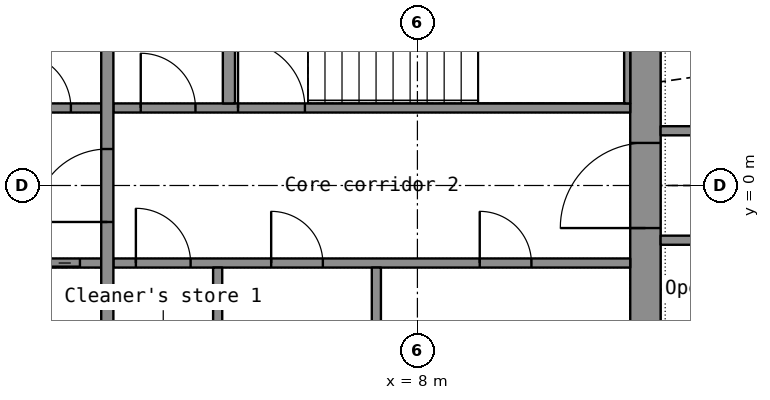
"""IFC4 building model, lengths in metres.
Left out: names, types, materials, properties, quantities, classifications, styles, units other than length and angle.
Written with IfcOpenShell. Run it as: python <this file> out.ifc"""

import sys

from ifc_helpers import new_model, si_unit, direction, frame, frame_2d, origin, place, context, subcontext, project, spatial, rectangle, extrude, element, fill, save


model = new_model("IFC4")
c1 = context("Model", 3, precision=1e-05, world=origin(), true_north=direction((0.0, 1.0)))
c2 = subcontext(c1, "Body", "Model", "MODEL_VIEW")
j1 = project(units=[si_unit("LENGTHUNIT", "METRE"), si_unit("PLANEANGLEUNIT", "RADIAN")], contexts=[c1])
p1 = place(None, origin())
s1 = spatial("IfcSite", under=j1, at=p1, CompositionType="ELEMENT")
p2 = place(p1, origin())
s2 = spatial("IfcBuilding", under=s1, at=p2, CompositionType="ELEMENT")
p3 = place(p2, frame((0.0, 0.0, 130.4)))
s3 = spatial("IfcBuildingStorey", under=s2, at=p3, CompositionType="ELEMENT", Elevation=130.4)
p4 = place(p3, frame((11.75, -7.2, 0.0), z_axis=(0.0, 0.0, 1.0), x_axis=(0.0, 1.0, 0.0)))
e1 = element("IfcWall", 1, at=p4, inside=s3, PredefinedType="SHEAR", context=c2, shape_type="SweptSolid", body=[
    extrude(rectangle(XDim=14.4, YDim=0.5, at=frame_2d((7.2, 0.0))), origin(), (0.0, 0.0, 1.0), 3.3),
])
p5 = place(p4, frame((6.5, 0.0, 0.0)))
e2 = element("IfcOpeningElement", 2, at=p5, cuts=e1, PredefinedType="OPENING", context=c2, shape_type="SweptSolid", body=[
    extrude(rectangle(XDim=1.4, YDim=2.2, at=frame_2d((0.7, 1.1))), frame((0.0, 0.26, 0.0), z_axis=(0.0, -1.0, 0.0), x_axis=(1.0, 0.0, 0.0)), (0.0, 0.0, 1.0), 0.52),
])
p6 = place(p3, frame((-2.8, -1.275, 0.0), z_axis=(0.0, 0.0, 1.0), x_axis=(1.0, 0.0, 0.0)))
e3 = element("IfcWall", 3, at=p6, inside=s3, PredefinedType="SHEAR", context=c2, shape_type="SweptSolid", body=[
    extrude(rectangle(XDim=5.6, YDim=0.15, at=frame_2d((2.8, 0.0))), origin(), (0.0, 0.0, 1.0), 3.3),
])
p7 = place(p6, frame((4.15, 0.0, 0.0)))
e4 = element("IfcOpeningElement", 4, at=p7, cuts=e3, PredefinedType="OPENING", context=c2, shape_type="SweptSolid", body=[
    extrude(rectangle(XDim=1.1, YDim=2.2, at=frame_2d((0.55, 1.1))), frame((0.0, 0.085, 0.0), z_axis=(0.0, -1.0, 0.0), x_axis=(1.0, 0.0, 0.0)), (0.0, 0.0, 1.0), 0.17),
])
p8 = place(p6, frame((1.35, 0.0, 0.0)))
e5 = element("IfcOpeningElement", 5, at=p8, cuts=e3, PredefinedType="OPENING", context=c2, shape_type="SweptSolid", body=[
    extrude(rectangle(XDim=0.9, YDim=2.1, at=frame_2d((0.45, 1.05))), frame((0.0, 0.085, 0.0), z_axis=(0.0, -1.0, 0.0), x_axis=(1.0, 0.0, 0.0)), (0.0, 0.0, 1.0), 0.17),
])
p9 = place(p3, frame((3.0, -1.275, 0.0), z_axis=(0.0, 0.0, 1.0), x_axis=(1.0, 0.0, 0.0)))
e6 = element("IfcWall", 6, at=p9, inside=s3, PredefinedType="PARTITIONING", context=c2, shape_type="SweptSolid", body=[
    extrude(rectangle(XDim=8.5, YDim=0.15, at=frame_2d((4.25, 0.0))), origin(), (0.0, 0.0, 1.0), 3.3),
])
p10 = place(p9, frame((0.37, 0.0, 0.0)))
e7 = element("IfcOpeningElement", 7, at=p10, cuts=e6, PredefinedType="OPENING", context=c2, shape_type="SweptSolid", body=[
    extrude(rectangle(XDim=0.9, YDim=2.1, at=frame_2d((0.45, 1.05))), frame((0.0, 0.085, 0.0), z_axis=(0.0, -1.0, 0.0), x_axis=(1.0, 0.0, 0.0)), (0.0, 0.0, 1.0), 0.17),
])
p11 = place(p9, frame((2.595, 0.0, 0.0)))
e8 = element("IfcOpeningElement", 8, at=p11, cuts=e6, PredefinedType="OPENING", context=c2, shape_type="SweptSolid", body=[
    extrude(rectangle(XDim=0.85, YDim=2.1, at=frame_2d((0.425, 1.05))), frame((0.0, 0.085, 0.0), z_axis=(0.0, -1.0, 0.0), x_axis=(1.0, 0.0, 0.0)), (0.0, 0.0, 1.0), 0.17),
])
p12 = place(p9, frame((6.025, 0.0, 0.0)))
e9 = element("IfcOpeningElement", 9, at=p12, cuts=e6, PredefinedType="OPENING", context=c2, shape_type="SweptSolid", body=[
    extrude(rectangle(XDim=0.85, YDim=2.1, at=frame_2d((0.425, 1.05))), frame((0.0, 0.085, 0.0), z_axis=(0.0, -1.0, 0.0), x_axis=(1.0, 0.0, 0.0)), (0.0, 0.0, 1.0), 0.17),
])
p13 = place(p3, frame((-2.8, 1.275, 0.0), z_axis=(0.0, 0.0, 1.0), x_axis=(1.0, 0.0, 0.0)))
e10 = element("IfcWall", 10, at=p13, inside=s3, PredefinedType="SHEAR", context=c2, shape_type="SweptSolid", body=[
    extrude(rectangle(XDim=5.6, YDim=0.15, at=frame_2d((2.8, 0.0))), origin(), (0.0, 0.0, 1.0), 3.3),
])
p14 = place(p13, frame((0.35, 0.0, 0.0)))
e11 = element("IfcOpeningElement", 11, at=p14, cuts=e10, PredefinedType="OPENING", context=c2, shape_type="SweptSolid", body=[
    extrude(rectangle(XDim=1.1, YDim=2.2, at=frame_2d((0.55, 1.1))), frame((0.0, 0.085, 0.0), z_axis=(0.0, -1.0, 0.0), x_axis=(1.0, 0.0, 0.0)), (0.0, 0.0, 1.0), 0.17),
])
p15 = place(p13, frame((2.326, 0.0, 0.0)))
e12 = element("IfcOpeningElement", 12, at=p15, cuts=e10, PredefinedType="OPENING", context=c2, shape_type="SweptSolid", body=[
    extrude(rectangle(XDim=0.9, YDim=2.1, at=frame_2d((0.45, 1.05))), frame((0.0, 0.085, 0.0), z_axis=(0.0, -1.0, 0.0), x_axis=(1.0, 0.0, 0.0)), (0.0, 0.0, 1.0), 0.17),
])
p16 = place(p13, frame((4.201, 0.0, 0.0)))
e13 = element("IfcOpeningElement", 13, at=p16, cuts=e10, PredefinedType="OPENING", context=c2, shape_type="SweptSolid", body=[
    extrude(rectangle(XDim=0.9, YDim=2.1, at=frame_2d((0.45, 1.05))), frame((0.0, 0.085, 0.0), z_axis=(0.0, -1.0, 0.0), x_axis=(1.0, 0.0, 0.0)), (0.0, 0.0, 1.0), 0.17),
])
p17 = place(p3, frame((3.0, 1.275, 0.0), z_axis=(0.0, 0.0, 1.0), x_axis=(1.0, 0.0, 0.0)))
e14 = element("IfcWall", 14, at=p17, inside=s3, PredefinedType="SHEAR", context=c2, shape_type="SweptSolid", body=[
    extrude(rectangle(XDim=8.5, YDim=0.15, at=frame_2d((4.25, 0.0))), origin(), (0.0, 0.0, 1.0), 3.3),
])
p18 = place(p17, frame((2.05, 0.0, 0.0)))
e15 = element("IfcOpeningElement", 15, at=p18, cuts=e14, PredefinedType="OPENING", context=c2, shape_type="SweptSolid", body=[
    extrude(rectangle(XDim=1.1, YDim=2.15, at=frame_2d((0.55, 1.075))), frame((0.0, 0.085, 0.0), z_axis=(0.0, -1.0, 0.0), x_axis=(1.0, 0.0, 0.0)), (0.0, 0.0, 1.0), 0.17),
])
p19 = place(p17, frame((0.45, 0.0, 0.0)))
e16 = element("IfcOpeningElement", 16, at=p19, cuts=e14, PredefinedType="OPENING", context=c2, shape_type="SweptSolid", body=[
    extrude(rectangle(XDim=0.9, YDim=2.1, at=frame_2d((0.45, 1.05))), frame((0.0, 0.085, 0.0), z_axis=(0.0, -1.0, 0.0), x_axis=(1.0, 0.0, 0.0)), (0.0, 0.0, 1.0), 0.17),
])
p20 = place(p3, frame((2.9, -3.7, 0.0), z_axis=(0.0, 0.0, 1.0), x_axis=(0.0, 1.0, 0.0)))
e17 = element("IfcWall", 17, at=p20, inside=s3, PredefinedType="SHEAR", context=c2, shape_type="SweptSolid", body=[
    extrude(rectangle(XDim=7.4, YDim=0.2, at=frame_2d((3.7, 0.0))), origin(), (0.0, 0.0, 1.0), 3.3),
])
p21 = place(p20, frame((3.1, 0.0, 0.0)))
e18 = element("IfcOpeningElement", 18, at=p21, cuts=e17, PredefinedType="OPENING", context=c2, shape_type="SweptSolid", body=[
    extrude(rectangle(XDim=1.2, YDim=2.2, at=frame_2d((0.6, 1.1))), frame((0.0, 0.11, 0.0), z_axis=(0.0, -1.0, 0.0), x_axis=(1.0, 0.0, 0.0)), (0.0, 0.0, 1.0), 0.22),
])
p22 = place(p3, frame((11.45, 1.35, 0.0), z_axis=(0.0, 0.0, 1.0), x_axis=(0.0, 1.0, 0.0)))
e19 = element("IfcWall", 19, at=p22, inside=s3, PredefinedType="SHEAR", context=c2, shape_type="SweptSolid", body=[
    extrude(rectangle(XDim=2.35, YDim=0.1, at=frame_2d((1.175, 0.0))), origin(), (0.0, 0.0, 1.0), 3.3),
])
p23 = place(p3, frame((4.9, 1.35, 0.0), z_axis=(0.0, 0.0, 1.0), x_axis=(0.0, 1.0, 0.0)))
e20 = element("IfcWall", 20, at=p23, inside=s3, PredefinedType="SHEAR", context=c2, shape_type="SweptSolid", body=[
    extrude(rectangle(XDim=2.35, YDim=0.2, at=frame_2d((1.175, 0.0))), origin(), (0.0, 0.0, 1.0), 3.3),
])
for number, where, z_axis, x_axis in (
    (21, (4.715, -3.7, 0.0), (0.0, 0.0, 1.0), (0.0, 1.0, 0.0)),
    (22, (7.325, -3.7, 0.0), (0.0, 0.0, 1.0), (0.0, 1.0, 0.0)),
):
    element("IfcWall", number, at=place(p3, frame(where, z_axis=z_axis, x_axis=x_axis)), inside=s3, PredefinedType="PARTITIONING", context=c2, shape_type="SweptSolid", body=[
        extrude(rectangle(XDim=2.35, YDim=0.15, at=frame_2d((1.175, 0.0))), origin(), (0.0, 0.0, 1.0), 3.3),
    ])
p24 = place(p3, frame((12.0, -0.9, 0.0), z_axis=(0.0, 0.0, 1.0), x_axis=(1.0, 0.0, 0.0)))
e23 = element("IfcWall", 23, at=p24, inside=s3, PredefinedType="PARTITIONING", context=c2, shape_type="SweptSolid", body=[
    extrude(rectangle(XDim=4.0, YDim=0.15, at=frame_2d((2.0, 0.0))), origin(), (0.0, 0.0, 1.0), 2.4),
])
p25 = place(p24, frame((1.4, 0.0, 0.0)))
e24 = element("IfcOpeningElement", 24, at=p25, cuts=e23, PredefinedType="OPENING", context=c2, shape_type="SweptSolid", body=[
    extrude(rectangle(XDim=1.2, YDim=2.2, at=frame_2d((0.6, 1.1))), frame((0.0, 0.085, 0.0), z_axis=(0.0, -1.0, 0.0), x_axis=(1.0, 0.0, 0.0)), (0.0, 0.0, 1.0), 0.17),
])
p26 = place(p3, frame((15.923, 0.9, 0.0), z_axis=(0.0, 0.0, 1.0), x_axis=(-1.0, 0.0, 0.0)))
e25 = element("IfcWall", 25, at=p26, inside=s3, PredefinedType="PARTITIONING", context=c2, shape_type="SweptSolid", body=[
    extrude(rectangle(XDim=3.923, YDim=0.15, at=frame_2d((1.961, 0.0))), origin(), (0.0, 0.0, 1.0), 2.4),
])
p27 = place(p5, origin())
e26 = element("IfcDoor", 26, at=p27, inside=s3, OperationType="DOUBLE_DOOR_SINGLE_SWING", PredefinedType="DOOR", context=c2, shape_type="SweptSolid", body=[
    extrude(rectangle(XDim=1.4, YDim=2.2, at=frame_2d((0.7, 1.1))), frame((0.0, 0.025, 0.0), z_axis=(0.0, -1.0, 0.0), x_axis=(1.0, 0.0, 0.0)), (0.0, 0.0, 1.0), 0.05),
])
fill(e2, e26)
p28 = place(p21, origin())
e27 = element("IfcDoor", 27, at=p28, inside=s3, OperationType="SINGLE_SWING_LEFT", PredefinedType="DOOR", context=c2, shape_type="SweptSolid", body=[
    extrude(rectangle(XDim=1.2, YDim=2.2, at=frame_2d((0.6, 1.1))), frame((0.0, 0.025, 0.0), z_axis=(0.0, -1.0, 0.0), x_axis=(1.0, 0.0, 0.0)), (0.0, 0.0, 1.0), 0.05),
])
fill(e18, e27)
p29 = place(p7, origin())
e28 = element("IfcDoor", 28, at=p29, inside=s3, OperationType="DOUBLE_DOOR_SLIDING", PredefinedType="DOOR", context=c2, shape_type="SweptSolid", body=[
    extrude(rectangle(XDim=1.1, YDim=2.2, at=frame_2d((0.55, 1.1))), frame((0.0, 0.025, 0.0), z_axis=(0.0, -1.0, 0.0), x_axis=(1.0, 0.0, 0.0)), (0.0, 0.0, 1.0), 0.05),
])
fill(e4, e28)
p30 = place(p18, origin())
e29 = element("IfcDoor", 29, at=p30, inside=s3, OperationType="SINGLE_SWING_LEFT", PredefinedType="DOOR", context=c2, shape_type="SweptSolid", body=[
    extrude(rectangle(XDim=1.1, YDim=2.15, at=frame_2d((0.55, 1.075))), frame((0.0, 0.025, 0.0), z_axis=(0.0, -1.0, 0.0), x_axis=(1.0, 0.0, 0.0)), (0.0, 0.0, 1.0), 0.05),
])
fill(e15, e29)
p31 = place(p10, origin())
e30 = element("IfcDoor", 30, at=p31, inside=s3, OperationType="SINGLE_SWING_LEFT", PredefinedType="DOOR", context=c2, shape_type="SweptSolid", body=[
    extrude(rectangle(XDim=0.9, YDim=2.1, at=frame_2d((0.45, 1.05))), frame((0.0, 0.025, 0.0), z_axis=(0.0, -1.0, 0.0), x_axis=(1.0, 0.0, 0.0)), (0.0, 0.0, 1.0), 0.05),
])
fill(e7, e30)
p32 = place(p11, origin())
e31 = element("IfcDoor", 31, at=p32, inside=s3, OperationType="SINGLE_SWING_LEFT", PredefinedType="DOOR", context=c2, shape_type="SweptSolid", body=[
    extrude(rectangle(XDim=0.85, YDim=2.1, at=frame_2d((0.425, 1.05))), frame((0.0, 0.025, 0.0), z_axis=(0.0, -1.0, 0.0), x_axis=(1.0, 0.0, 0.0)), (0.0, 0.0, 1.0), 0.05),
])
fill(e8, e31)
p33 = place(p12, origin())
e32 = element("IfcDoor", 32, at=p33, inside=s3, OperationType="SINGLE_SWING_LEFT", PredefinedType="DOOR", context=c2, shape_type="SweptSolid", body=[
    extrude(rectangle(XDim=0.85, YDim=2.1, at=frame_2d((0.425, 1.05))), frame((0.0, 0.025, 0.0), z_axis=(0.0, -1.0, 0.0), x_axis=(1.0, 0.0, 0.0)), (0.0, 0.0, 1.0), 0.05),
])
fill(e9, e32)
p34 = place(p16, origin())
e33 = element("IfcDoor", 33, at=p34, inside=s3, OperationType="SINGLE_SWING_LEFT", PredefinedType="DOOR", context=c2, shape_type="SweptSolid", body=[
    extrude(rectangle(XDim=0.9, YDim=2.1, at=frame_2d((0.45, 1.05))), frame((0.0, 0.025, 0.0), z_axis=(0.0, -1.0, 0.0), x_axis=(1.0, 0.0, 0.0)), (0.0, 0.0, 1.0), 0.05),
])
fill(e13, e33)
p35 = place(p19, origin())
e34 = element("IfcDoor", 34, at=p35, inside=s3, OperationType="SINGLE_SWING_LEFT", PredefinedType="DOOR", context=c2, shape_type="SweptSolid", body=[
    extrude(rectangle(XDim=0.9, YDim=2.1, at=frame_2d((0.45, 1.05))), frame((0.0, 0.025, 0.0), z_axis=(0.0, -1.0, 0.0), x_axis=(1.0, 0.0, 0.0)), (0.0, 0.0, 1.0), 0.05),
])
fill(e16, e34)
save(model, sys.argv[1])
